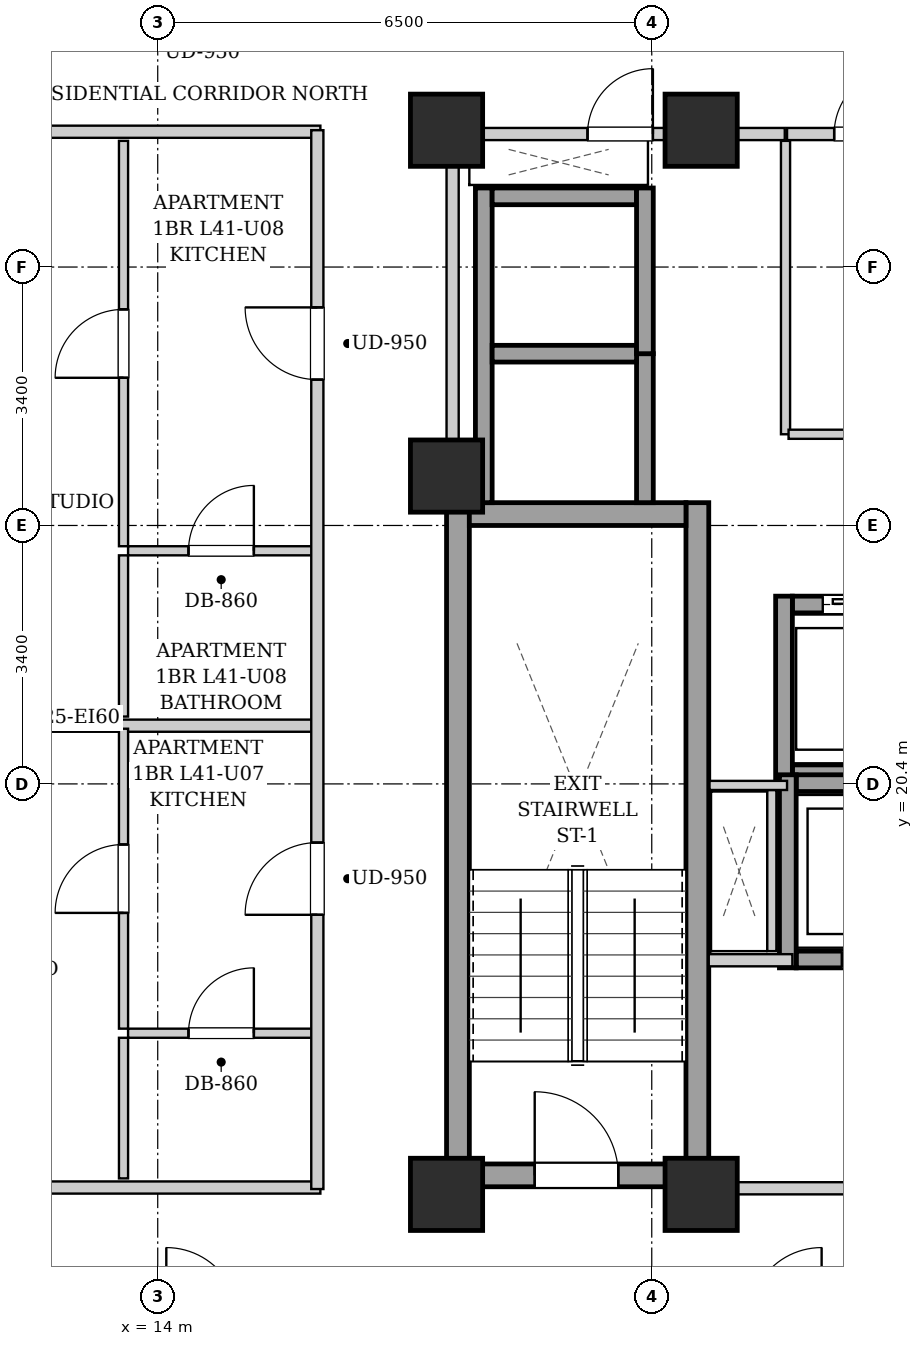
"""IFC4 building model, lengths in metres.
Left out: names, types, materials, properties, quantities, classifications, styles, units other than length and angle.
Written with IfcOpenShell. Run it as: python <this file> out.ifc"""

import sys

from ifc_helpers import new_model, si_unit, direction, frame, frame_2d, origin, origin_2d, place, context, subcontext, project, spatial, rectangle, extrude, element, fill, save


model = new_model("IFC4")
c1 = context("Model", 3, precision=1e-05, world=origin(), true_north=direction((0.0, 1.0)))
c2 = subcontext(c1, "Body", "Model", "MODEL_VIEW")
j1 = project(units=[si_unit("LENGTHUNIT", "METRE"), si_unit("PLANEANGLEUNIT", "RADIAN")], contexts=[c1])
p1 = place(None, origin())
s1 = spatial("IfcSite", under=j1, at=p1, CompositionType="ELEMENT")
p2 = place(p1, origin())
s2 = spatial("IfcBuilding", under=s1, at=p2, CompositionType="ELEMENT")
p3 = place(p2, frame((0.0, 0.0, 143.9)))
s3 = spatial("IfcBuildingStorey", under=s2, at=p3, CompositionType="ELEMENT", Elevation=143.9)
for number, where, z_axis, x_axis in (
    (1, (17.8, 15.0, 0.0), (0.0, 0.0, 1.0), (1.0, 0.0, 0.0)),
    (2, (21.15, 15.0, 0.0), (0.0, 0.0, 1.0), (1.0, 0.0, 0.0)),
    (3, (17.8, 29.0, 0.0), (0.0, 0.0, 1.0), (1.0, 0.0, 0.0)),
    (4, (21.15, 29.0, 0.0), (0.0, 0.0, 1.0), (1.0, 0.0, 0.0)),
    (5, (17.8, 24.45, 0.0), (0.0, 0.0, 1.0), (1.0, 0.0, 0.0)),
):
    element("IfcColumn", number, at=place(p3, frame(where, z_axis=z_axis, x_axis=x_axis)), inside=s3, PredefinedType="COLUMN", context=c2, shape_type="SweptSolid", body=[
        extrude(rectangle(XDim=0.95, YDim=0.95, at=origin_2d()), origin(), (0.0, 0.0, 1.0), 3.25),
    ])
for number, where, z_axis, x_axis in (
    (6, (17.95, 15.1, 0.0), (0.0, 0.0, 1.0), (0.0, 1.0, 0.0)),
    (7, (21.1, 15.1, 0.0), (0.0, 0.0, 1.0), (0.0, 1.0, 0.0)),
):
    element("IfcWall", number, at=place(p3, frame(where, z_axis=z_axis, x_axis=x_axis)), inside=s3, PredefinedType="SHEAR", context=c2, shape_type="SweptSolid", body=[
        extrude(rectangle(XDim=9.0, YDim=0.3, at=frame_2d((4.5, 0.0))), origin(), (0.0, 0.0, 1.0), 2.99),
    ])
p4 = place(p3, frame((18.1, 23.95, 0.0), z_axis=(0.0, 0.0, 1.0), x_axis=(1.0, 0.0, 0.0)))
e8 = element("IfcWall", 8, at=p4, inside=s3, PredefinedType="SHEAR", context=c2, shape_type="SweptSolid", body=[
    extrude(rectangle(XDim=2.85, YDim=0.3, at=frame_2d((1.425, 0.0))), origin(), (0.0, 0.0, 1.0), 2.99),
])
p5 = place(p3, frame((18.1, 15.25, 0.0), z_axis=(0.0, 0.0, 1.0), x_axis=(1.0, 0.0, 0.0)))
e9 = element("IfcWall", 9, at=p5, inside=s3, PredefinedType="SHEAR", context=c2, shape_type="SweptSolid", body=[
    extrude(rectangle(XDim=2.85, YDim=0.3, at=frame_2d((1.425, 0.0))), origin(), (0.0, 0.0, 1.0), 2.99),
])
p6 = place(p5, frame((0.86, 0.0, 0.0)))
e10 = element("IfcOpeningElement", 10, at=p6, cuts=e9, PredefinedType="OPENING", context=c2, shape_type="SweptSolid", body=[
    extrude(rectangle(XDim=1.1, YDim=2.05, at=frame_2d((0.55, 1.025))), frame((0.0, 0.16, 0.0), z_axis=(0.0, -1.0, 0.0), x_axis=(1.0, 0.0, 0.0)), (0.0, 0.0, 1.0), 0.32),
])
p7 = place(p3, frame((22.35, 20.54, 0.0), z_axis=(0.0, 0.0, 1.0), x_axis=(1.0, 0.0, 0.0)))
e11 = element("IfcWall", 11, at=p7, inside=s3, PredefinedType="SHEAR", context=c2, shape_type="SweptSolid", body=[
    extrude(rectangle(XDim=1.9, YDim=0.22, at=frame_2d((0.95, 0.0))), origin(), (0.0, 0.0, 1.0), 2.99),
])
p8 = place(p3, frame((22.35, 22.76, 0.0), z_axis=(0.0, 0.0, 1.0), x_axis=(1.0, 0.0, 0.0)))
e12 = element("IfcWall", 12, at=p8, inside=s3, PredefinedType="SHEAR", context=c2, shape_type="SweptSolid", body=[
    extrude(rectangle(XDim=1.9, YDim=0.22, at=frame_2d((0.95, 0.0))), origin(), (0.0, 0.0, 1.0), 2.99),
])
p9 = place(p8, frame((0.4, 0.0, 0.0)))
e13 = element("IfcOpeningElement", 13, at=p9, cuts=e12, PredefinedType="OPENING", context=c2, shape_type="SweptSolid", body=[
    extrude(rectangle(XDim=1.1, YDim=2.15, at=frame_2d((0.55, 1.075))), frame((0.0, 0.12, 0.0), z_axis=(0.0, -1.0, 0.0), x_axis=(1.0, 0.0, 0.0)), (0.0, 0.0, 1.0), 0.24),
])
p10 = place(p3, frame((22.24, 20.43, 0.0), z_axis=(0.0, 0.0, 1.0), x_axis=(0.0, 1.0, 0.0)))
e14 = element("IfcWall", 14, at=p10, inside=s3, PredefinedType="SHEAR", context=c2, shape_type="SweptSolid", body=[
    extrude(rectangle(XDim=2.44, YDim=0.22, at=frame_2d((1.22, 0.0))), origin(), (0.0, 0.0, 1.0), 2.99),
])
p11 = place(p3, frame((18.29, 24.1, 0.0), z_axis=(0.0, 0.0, 1.0), x_axis=(0.0, 1.0, 0.0)))
e15 = element("IfcWall", 15, at=p11, inside=s3, PredefinedType="SHEAR", context=c2, shape_type="SweptSolid", body=[
    extrude(rectangle(XDim=4.14, YDim=0.22, at=frame_2d((2.07, 0.0))), origin(), (0.0, 0.0, 1.0), 2.99),
])
p12 = place(p3, frame((20.41, 24.1, 0.0), z_axis=(0.0, 0.0, 1.0), x_axis=(0.0, 1.0, 0.0)))
e16 = element("IfcWall", 16, at=p12, inside=s3, PredefinedType="SHEAR", context=c2, shape_type="SweptSolid", body=[
    extrude(rectangle(XDim=1.96, YDim=0.22, at=frame_2d((0.98, 0.0))), origin(), (0.0, 0.0, 1.0), 2.99),
])
for number, where, z_axis, x_axis in (
    (17, (18.4, 26.06, 0.0), (0.0, 0.0, 1.0), (1.0, 0.0, 0.0)),
    (18, (18.4, 28.13, 0.0), (0.0, 0.0, 1.0), (1.0, 0.0, 0.0)),
):
    element("IfcWall", number, at=place(p3, frame(where, z_axis=z_axis, x_axis=x_axis)), inside=s3, PredefinedType="SHEAR", context=c2, shape_type="SweptSolid", body=[
        extrude(rectangle(XDim=1.9, YDim=0.22, at=frame_2d((0.95, 0.0))), origin(), (0.0, 0.0, 1.0), 2.99),
    ])
p13 = place(p3, frame((20.41, 26.06, 0.0), z_axis=(0.0, 0.0, 1.0), x_axis=(0.0, 1.0, 0.0)))
e19 = element("IfcWall", 19, at=p13, inside=s3, PredefinedType="SHEAR", context=c2, shape_type="SweptSolid", body=[
    extrude(rectangle(XDim=2.18, YDim=0.22, at=frame_2d((1.09, 0.0))), origin(), (0.0, 0.0, 1.0), 2.99),
])
p14 = place(p3, frame((22.4, 18.09, 0.0), z_axis=(0.0, 0.0, 1.0), x_axis=(1.0, 0.0, 0.0)))
e20 = element("IfcWall", 20, at=p14, inside=s3, PredefinedType="SHEAR", context=c2, shape_type="SweptSolid", body=[
    extrude(rectangle(XDim=2.4, YDim=0.22, at=frame_2d((1.2, 0.0))), origin(), (0.0, 0.0, 1.0), 2.99),
])
p15 = place(p14, frame((0.6, 0.0, 0.0)))
e21 = element("IfcOpeningElement", 21, at=p15, cuts=e20, PredefinedType="OPENING", context=c2, shape_type="SweptSolid", body=[
    extrude(rectangle(XDim=1.2, YDim=2.15, at=frame_2d((0.6, 1.075))), frame((0.0, 0.12, 0.0), z_axis=(0.0, -1.0, 0.0), x_axis=(1.0, 0.0, 0.0)), (0.0, 0.0, 1.0), 0.24),
])
p16 = place(p3, frame((22.4, 20.41, 0.0), z_axis=(0.0, 0.0, 1.0), x_axis=(1.0, 0.0, 0.0)))
e22 = element("IfcWall", 22, at=p16, inside=s3, PredefinedType="SHEAR", context=c2, shape_type="SweptSolid", body=[
    extrude(rectangle(XDim=2.4, YDim=0.22, at=frame_2d((1.2, 0.0))), origin(), (0.0, 0.0, 1.0), 2.99),
])
p17 = place(p3, frame((22.29, 17.98, 0.0), z_axis=(0.0, 0.0, 1.0), x_axis=(0.0, 1.0, 0.0)))
e23 = element("IfcWall", 23, at=p17, inside=s3, PredefinedType="SHEAR", context=c2, shape_type="SweptSolid", body=[
    extrude(rectangle(XDim=2.54, YDim=0.22, at=frame_2d((1.27, 0.0))), origin(), (0.0, 0.0, 1.0), 2.99),
])
p18 = place(p3, frame((21.25, 15.08, 0.0), z_axis=(0.0, 0.0, 1.0), x_axis=(1.0, 0.0, 0.0)))
e24 = element("IfcWall", 24, at=p18, inside=s3, PredefinedType="PARTITIONING", context=c2, shape_type="SweptSolid", body=[
    extrude(rectangle(XDim=8.5, YDim=0.16, at=frame_2d((4.25, 0.0))), origin(), (0.0, 0.0, 1.0), 2.426),
])
p19 = place(p18, frame((3.725, 0.0, 0.0)))
e25 = element("IfcOpeningElement", 25, at=p19, cuts=e24, PredefinedType="OPENING", context=c2, shape_type="SweptSolid", body=[
    extrude(rectangle(XDim=1.05, YDim=2.05, at=frame_2d((0.525, 1.025))), frame((0.0, 0.09, 0.0), z_axis=(0.0, -1.0, 0.0), x_axis=(1.0, 0.0, 0.0)), (0.0, 0.0, 1.0), 0.18),
])
p20 = place(p3, frame((21.25, 18.08, 0.0), z_axis=(0.0, 0.0, 1.0), x_axis=(1.0, 0.0, 0.0)))
e26 = element("IfcWall", 26, at=p20, inside=s3, PredefinedType="PARTITIONING", context=c2, shape_type="SweptSolid", body=[
    extrude(rectangle(XDim=1.1, YDim=0.16, at=frame_2d((0.55, 0.0))), origin(), (0.0, 0.0, 1.0), 2.99),
])
p21 = place(p3, frame((17.88, 24.12, 0.0), z_axis=(0.0, 0.0, 1.0), x_axis=(0.0, 1.0, 0.0)))
e27 = element("IfcWall", 27, at=p21, inside=s3, PredefinedType="PARTITIONING", context=c2, shape_type="SweptSolid", body=[
    extrude(rectangle(XDim=4.76, YDim=0.16, at=frame_2d((2.38, 0.0))), origin(), (0.0, 0.0, 1.0), 2.99),
])
p22 = place(p3, frame((17.96, 28.95, 0.0), z_axis=(0.0, 0.0, 1.0), x_axis=(1.0, 0.0, 0.0)))
e28 = element("IfcWall", 28, at=p22, inside=s3, PredefinedType="PARTITIONING", context=c2, shape_type="SweptSolid", body=[
    extrude(rectangle(XDim=4.29, YDim=0.16, at=frame_2d((2.145, 0.0))), origin(), (0.0, 0.0, 1.0), 2.426),
])
p23 = place(p22, frame((1.695, 0.0, 0.0)))
e29 = element("IfcOpeningElement", 29, at=p23, cuts=e28, PredefinedType="OPENING", context=c2, shape_type="SweptSolid", body=[
    extrude(rectangle(XDim=0.86, YDim=2.05, at=frame_2d((0.43, 1.025))), frame((0.0, 0.09, 0.0), z_axis=(0.0, -1.0, 0.0), x_axis=(1.0, 0.0, 0.0)), (0.0, 0.0, 1.0), 0.18),
])
p24 = place(p3, frame((22.08, 18.2, 0.0), z_axis=(0.0, 0.0, 1.0), x_axis=(0.0, 1.0, 0.0)))
e30 = element("IfcWall", 30, at=p24, inside=s3, PredefinedType="PARTITIONING", context=c2, shape_type="SweptSolid", body=[
    extrude(rectangle(XDim=2.12, YDim=0.12, at=frame_2d((1.06, 0.0))), origin(), (0.0, 0.0, 1.0), 2.99),
])
p25 = place(p3, frame((22.28, 20.38, 0.0), z_axis=(0.0, 0.0, 1.0), x_axis=(-1.0, 0.0, 0.0)))
e31 = element("IfcWall", 31, at=p25, inside=s3, PredefinedType="PARTITIONING", context=c2, shape_type="SweptSolid", body=[
    extrude(rectangle(XDim=1.02, YDim=0.12, at=frame_2d((0.51, 0.0))), origin(), (0.0, 0.0, 1.0), 2.99),
])
p26 = place(p3, frame((22.26, 25.0, 0.0), z_axis=(0.0, 0.0, 1.0), x_axis=(0.0, 1.0, 0.0)))
e32 = element("IfcWall", 32, at=p26, inside=s3, PredefinedType="PARTITIONING", context=c2, shape_type="SweptSolid", body=[
    extrude(rectangle(XDim=3.86, YDim=0.12, at=frame_2d((1.93, 0.0))), origin(), (0.0, 0.0, 1.0), 2.99),
])
p27 = place(p3, frame((22.3, 25.0, 0.0), z_axis=(0.0, 0.0, 1.0), x_axis=(1.0, 0.0, 0.0)))
e33 = element("IfcWall", 33, at=p27, inside=s3, PredefinedType="PARTITIONING", context=c2, shape_type="SweptSolid", body=[
    extrude(rectangle(XDim=2.04, YDim=0.12, at=frame_2d((1.02, 0.0))), origin(), (0.0, 0.0, 1.0), 2.99),
])
p28 = place(p3, frame((22.28, 28.95, 0.0), z_axis=(0.0, 0.0, 1.0), x_axis=(1.0, 0.0, 0.0)))
e34 = element("IfcWall", 34, at=p28, inside=s3, PredefinedType="PARTITIONING", context=c2, shape_type="SweptSolid", body=[
    extrude(rectangle(XDim=2.06, YDim=0.16, at=frame_2d((1.03, 0.0))), origin(), (0.0, 0.0, 1.0), 2.426),
])
p29 = place(p28, frame((0.62, 0.0, 0.0)))
e35 = element("IfcOpeningElement", 35, at=p29, cuts=e34, PredefinedType="OPENING", context=c2, shape_type="SweptSolid", body=[
    extrude(rectangle(XDim=0.86, YDim=2.05, at=frame_2d((0.43, 1.025))), frame((0.0, 0.09, 0.0), z_axis=(0.0, -1.0, 0.0), x_axis=(1.0, 0.0, 0.0)), (0.0, 0.0, 1.0), 0.18),
])
for number, where, z_axis, x_axis in (
    (36, (7.78, 15.09, 0.0), (0.0, 0.0, 1.0), (1.0, 0.0, 0.0)),
    (37, (7.78, 28.98, 0.0), (0.0, 0.0, 1.0), (1.0, 0.0, 0.0)),
):
    element("IfcWall", number, at=place(p3, frame(where, z_axis=z_axis, x_axis=x_axis)), inside=s3, PredefinedType="PARTITIONING", context=c2, shape_type="SweptSolid", body=[
        extrude(rectangle(XDim=8.36, YDim=0.16, at=frame_2d((4.18, 0.0))), origin(), (0.0, 0.0, 1.0), 2.426),
    ])
p30 = place(p3, frame((7.78, 21.166, 0.0), z_axis=(0.0, 0.0, 1.0), x_axis=(1.0, 0.0, 0.0)))
e38 = element("IfcWall", 38, at=p30, inside=s3, PredefinedType="PARTITIONING", context=c2, shape_type="SweptSolid", body=[
    extrude(rectangle(XDim=8.28, YDim=0.16, at=frame_2d((4.14, 0.0))), origin(), (0.0, 0.0, 1.0), 2.99),
])
p31 = place(p3, frame((13.61, 17.12, 0.0), z_axis=(0.0, 0.0, 1.0), x_axis=(1.0, 0.0, 0.0)))
e39 = element("IfcWall", 39, at=p31, inside=s3, PredefinedType="PARTITIONING", context=c2, shape_type="SweptSolid", body=[
    extrude(rectangle(XDim=2.45, YDim=0.12, at=frame_2d((1.225, 0.0))), origin(), (0.0, 0.0, 1.0), 2.99),
])
p32 = place(p31, frame((0.795, 0.0, 0.0)))
e40 = element("IfcOpeningElement", 40, at=p32, cuts=e39, PredefinedType="OPENING", context=c2, shape_type="SweptSolid", body=[
    extrude(rectangle(XDim=0.86, YDim=2.05, at=frame_2d((0.43, 1.025))), frame((0.0, 0.07, 0.0), z_axis=(0.0, -1.0, 0.0), x_axis=(1.0, 0.0, 0.0)), (0.0, 0.0, 1.0), 0.14),
])
p33 = place(p3, frame((13.55, 15.21, 0.0), z_axis=(0.0, 0.0, 1.0), x_axis=(0.0, 1.0, 0.0)))
e41 = element("IfcWall", 41, at=p33, inside=s3, PredefinedType="PARTITIONING", context=c2, shape_type="SweptSolid", body=[
    extrude(rectangle(XDim=1.85, YDim=0.12, at=frame_2d((0.925, 0.0))), origin(), (0.0, 0.0, 1.0), 2.99),
])
p34 = place(p3, frame((13.55, 17.18, 0.0), z_axis=(0.0, 0.0, 1.0), x_axis=(0.0, 1.0, 0.0)))
e42 = element("IfcWall", 42, at=p34, inside=s3, PredefinedType="PARTITIONING", context=c2, shape_type="SweptSolid", body=[
    extrude(rectangle(XDim=3.946, YDim=0.12, at=frame_2d((1.973, 0.0))), origin(), (0.0, 0.0, 1.0), 2.99),
])
p35 = place(p34, frame((1.523, 0.0, 0.0)))
e43 = element("IfcOpeningElement", 43, at=p35, cuts=e42, PredefinedType="OPENING", context=c2, shape_type="SweptSolid", body=[
    extrude(rectangle(XDim=0.9, YDim=2.05, at=frame_2d((0.45, 1.025))), frame((0.0, 0.07, 0.0), z_axis=(0.0, -1.0, 0.0), x_axis=(1.0, 0.0, 0.0)), (0.0, 0.0, 1.0), 0.14),
])
p36 = place(p3, frame((13.61, 23.467, 0.0), z_axis=(0.0, 0.0, 1.0), x_axis=(1.0, 0.0, 0.0)))
e44 = element("IfcWall", 44, at=p36, inside=s3, PredefinedType="PARTITIONING", context=c2, shape_type="SweptSolid", body=[
    extrude(rectangle(XDim=2.45, YDim=0.12, at=frame_2d((1.225, 0.0))), origin(), (0.0, 0.0, 1.0), 2.99),
])
p37 = place(p36, frame((0.795, 0.0, 0.0)))
e45 = element("IfcOpeningElement", 45, at=p37, cuts=e44, PredefinedType="OPENING", context=c2, shape_type="SweptSolid", body=[
    extrude(rectangle(XDim=0.86, YDim=2.05, at=frame_2d((0.43, 1.025))), frame((0.0, 0.07, 0.0), z_axis=(0.0, -1.0, 0.0), x_axis=(1.0, 0.0, 0.0)), (0.0, 0.0, 1.0), 0.14),
])
p38 = place(p3, frame((13.55, 21.286, 0.0), z_axis=(0.0, 0.0, 1.0), x_axis=(0.0, 1.0, 0.0)))
e46 = element("IfcWall", 46, at=p38, inside=s3, PredefinedType="PARTITIONING", context=c2, shape_type="SweptSolid", body=[
    extrude(rectangle(XDim=2.121, YDim=0.12, at=frame_2d((1.061, 0.0))), origin(), (0.0, 0.0, 1.0), 2.99),
])
p39 = place(p3, frame((13.55, 23.527, 0.0), z_axis=(0.0, 0.0, 1.0), x_axis=(0.0, 1.0, 0.0)))
e47 = element("IfcWall", 47, at=p39, inside=s3, PredefinedType="PARTITIONING", context=c2, shape_type="SweptSolid", body=[
    extrude(rectangle(XDim=5.333, YDim=0.12, at=frame_2d((2.667, 0.0))), origin(), (0.0, 0.0, 1.0), 2.99),
])
p40 = place(p39, frame((2.216, 0.0, 0.0)))
e48 = element("IfcOpeningElement", 48, at=p40, cuts=e47, PredefinedType="OPENING", context=c2, shape_type="SweptSolid", body=[
    extrude(rectangle(XDim=0.9, YDim=2.05, at=frame_2d((0.45, 1.025))), frame((0.0, 0.07, 0.0), z_axis=(0.0, -1.0, 0.0), x_axis=(1.0, 0.0, 0.0)), (0.0, 0.0, 1.0), 0.14),
])
p41 = place(p3, frame((16.1, 15.07, 0.0), z_axis=(0.0, 0.0, 1.0), x_axis=(0.0, 1.0, 0.0)))
e49 = element("IfcWall", 49, at=p41, inside=s3, PredefinedType="PARTITIONING", context=c2, shape_type="SweptSolid", body=[
    extrude(rectangle(XDim=13.93, YDim=0.16, at=frame_2d((6.965, 0.0))), origin(), (0.0, 0.0, 1.0), 2.99),
])
p42 = place(p41, frame((3.608, 0.0, 0.0)))
e50 = element("IfcOpeningElement", 50, at=p42, cuts=e49, PredefinedType="OPENING", context=c2, shape_type="SweptSolid", body=[
    extrude(rectangle(XDim=0.95, YDim=2.1, at=frame_2d((0.475, 1.05))), frame((0.0, 0.09, 0.0), z_axis=(0.0, -1.0, 0.0), x_axis=(1.0, 0.0, 0.0)), (0.0, 0.0, 1.0), 0.18),
])
p43 = place(p41, frame((10.649, 0.0, 0.0)))
e51 = element("IfcOpeningElement", 51, at=p43, cuts=e49, PredefinedType="OPENING", context=c2, shape_type="SweptSolid", body=[
    extrude(rectangle(XDim=0.95, YDim=2.1, at=frame_2d((0.475, 1.05))), frame((0.0, 0.09, 0.0), z_axis=(0.0, -1.0, 0.0), x_axis=(1.0, 0.0, 0.0)), (0.0, 0.0, 1.0), 0.18),
])
p44 = place(p6, origin())
e52 = element("IfcDoor", 52, at=p44, inside=s3, OperationType="SINGLE_SWING_LEFT", PredefinedType="DOOR", context=c2, shape_type="SweptSolid", body=[
    extrude(rectangle(XDim=1.1, YDim=2.05, at=frame_2d((0.55, 1.025))), frame((0.0, 0.025, 0.0), z_axis=(0.0, -1.0, 0.0), x_axis=(1.0, 0.0, 0.0)), (0.0, 0.0, 1.0), 0.05),
])
fill(e10, e52)
p45 = place(p9, origin())
e53 = element("IfcDoor", 53, at=p45, inside=s3, OperationType="SLIDING_TO_LEFT", PredefinedType="DOOR", context=c2, shape_type="SweptSolid", body=[
    extrude(rectangle(XDim=1.1, YDim=2.15, at=frame_2d((0.55, 1.075))), frame((0.0, 0.025, 0.0), z_axis=(0.0, -1.0, 0.0), x_axis=(1.0, 0.0, 0.0)), (0.0, 0.0, 1.0), 0.05),
])
fill(e13, e53)
p46 = place(p15, origin())
e54 = element("IfcDoor", 54, at=p46, inside=s3, OperationType="SLIDING_TO_LEFT", PredefinedType="DOOR", context=c2, shape_type="SweptSolid", body=[
    extrude(rectangle(XDim=1.2, YDim=2.15, at=frame_2d((0.6, 1.075))), frame((0.0, 0.025, 0.0), z_axis=(0.0, -1.0, 0.0), x_axis=(1.0, 0.0, 0.0)), (0.0, 0.0, 1.0), 0.05),
])
fill(e21, e54)
p47 = place(p23, origin())
e55 = element("IfcDoor", 55, at=p47, inside=s3, OperationType="SINGLE_SWING_RIGHT", PredefinedType="DOOR", context=c2, shape_type="SweptSolid", body=[
    extrude(rectangle(XDim=0.86, YDim=2.05, at=frame_2d((0.43, 1.025))), frame((0.0, 0.025, 0.0), z_axis=(0.0, -1.0, 0.0), x_axis=(1.0, 0.0, 0.0)), (0.0, 0.0, 1.0), 0.05),
])
fill(e29, e55)
p48 = place(p29, origin())
e56 = element("IfcDoor", 56, at=p48, inside=s3, OperationType="SINGLE_SWING_RIGHT", PredefinedType="DOOR", context=c2, shape_type="SweptSolid", body=[
    extrude(rectangle(XDim=0.86, YDim=2.05, at=frame_2d((0.43, 1.025))), frame((0.0, 0.025, 0.0), z_axis=(0.0, -1.0, 0.0), x_axis=(1.0, 0.0, 0.0)), (0.0, 0.0, 1.0), 0.05),
])
fill(e35, e56)
p49 = place(p32, origin())
e57 = element("IfcDoor", 57, at=p49, inside=s3, OperationType="SINGLE_SWING_RIGHT", PredefinedType="DOOR", context=c2, shape_type="SweptSolid", body=[
    extrude(rectangle(XDim=0.86, YDim=2.05, at=frame_2d((0.43, 1.025))), frame((0.0, 0.025, 0.0), z_axis=(0.0, -1.0, 0.0), x_axis=(1.0, 0.0, 0.0)), (0.0, 0.0, 1.0), 0.05),
])
fill(e40, e57)
p50 = place(p35, origin())
e58 = element("IfcDoor", 58, at=p50, inside=s3, OperationType="SINGLE_SWING_LEFT", PredefinedType="DOOR", context=c2, shape_type="SweptSolid", body=[
    extrude(rectangle(XDim=0.9, YDim=2.05, at=frame_2d((0.45, 1.025))), frame((0.0, 0.025, 0.0), z_axis=(0.0, -1.0, 0.0), x_axis=(1.0, 0.0, 0.0)), (0.0, 0.0, 1.0), 0.05),
])
fill(e43, e58)
p51 = place(p37, origin())
e59 = element("IfcDoor", 59, at=p51, inside=s3, OperationType="SINGLE_SWING_RIGHT", PredefinedType="DOOR", context=c2, shape_type="SweptSolid", body=[
    extrude(rectangle(XDim=0.86, YDim=2.05, at=frame_2d((0.43, 1.025))), frame((0.0, 0.025, 0.0), z_axis=(0.0, -1.0, 0.0), x_axis=(1.0, 0.0, 0.0)), (0.0, 0.0, 1.0), 0.05),
])
fill(e45, e59)
p52 = place(p40, origin())
e60 = element("IfcDoor", 60, at=p52, inside=s3, OperationType="SINGLE_SWING_LEFT", PredefinedType="DOOR", context=c2, shape_type="SweptSolid", body=[
    extrude(rectangle(XDim=0.9, YDim=2.05, at=frame_2d((0.45, 1.025))), frame((0.0, 0.025, 0.0), z_axis=(0.0, -1.0, 0.0), x_axis=(1.0, 0.0, 0.0)), (0.0, 0.0, 1.0), 0.05),
])
fill(e48, e60)
p53 = place(p42, origin())
e61 = element("IfcDoor", 61, at=p53, inside=s3, OperationType="SINGLE_SWING_LEFT", PredefinedType="DOOR", context=c2, shape_type="SweptSolid", body=[
    extrude(rectangle(XDim=0.95, YDim=2.1, at=frame_2d((0.475, 1.05))), frame((0.0, 0.025, 0.0), z_axis=(0.0, -1.0, 0.0), x_axis=(1.0, 0.0, 0.0)), (0.0, 0.0, 1.0), 0.05),
])
fill(e50, e61)
p54 = place(p43, origin())
e62 = element("IfcDoor", 62, at=p54, inside=s3, OperationType="SINGLE_SWING_RIGHT", PredefinedType="DOOR", context=c2, shape_type="SweptSolid", body=[
    extrude(rectangle(XDim=0.95, YDim=2.1, at=frame_2d((0.475, 1.05))), frame((0.0, 0.025, 0.0), z_axis=(0.0, -1.0, 0.0), x_axis=(1.0, 0.0, 0.0)), (0.0, 0.0, 1.0), 0.05),
])
fill(e51, e62)
save(model, sys.argv[1])
